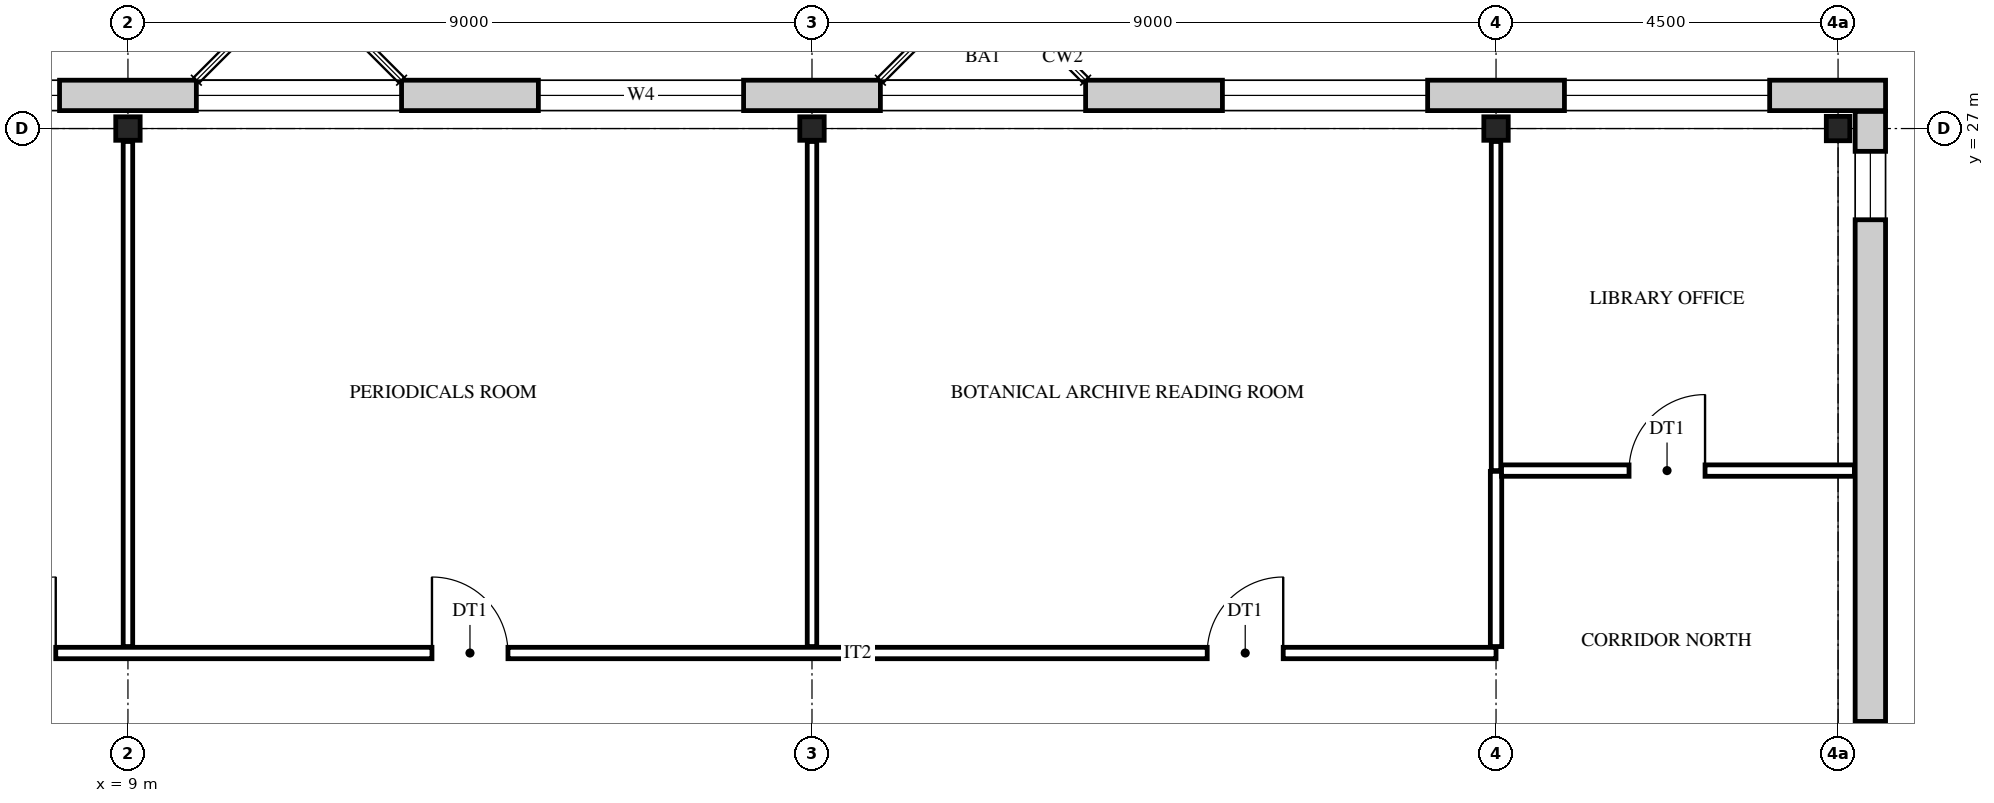
"""IFC4 building model, lengths in metres.
Left out: names, types, materials, properties, quantities, classifications, styles, units other than length and angle.
Written with IfcOpenShell. Run it as: python <this file> out.ifc"""

import sys

from ifc_helpers import new_model, si_unit, direction, frame, frame_2d, origin, origin_2d, place, context, subcontext, project, spatial, rectangle, i_section, extrude, element, fill, save


model = new_model("IFC4")
c1 = context("Model", 3, precision=1e-05, world=origin(), true_north=direction((0.0, 1.0)))
c2 = subcontext(c1, "Body", "Model", "MODEL_VIEW")
j1 = project(units=[si_unit("LENGTHUNIT", "METRE"), si_unit("PLANEANGLEUNIT", "RADIAN")], contexts=[c1])
p1 = place(None, origin())
s1 = spatial("IfcSite", under=j1, at=p1, CompositionType="ELEMENT")
p2 = place(p1, origin())
s2 = spatial("IfcBuilding", under=s1, at=p2, CompositionType="ELEMENT")
p3 = place(p2, frame((0.0, 0.0, 48.6)))
s3 = spatial("IfcBuildingStorey", under=s2, at=p3, CompositionType="ELEMENT", Elevation=48.6)
for number, where, z_axis, x_axis in (
    (1, (9.0, 27.0, 0.0), (0.0, 0.0, 1.0), (0.0, 1.0, 0.0)),
    (2, (18.0, 27.0, 0.0), (0.0, 0.0, 1.0), (0.0, 1.0, 0.0)),
    (3, (27.0, 27.0, 0.0), (0.0, 0.0, 1.0), (0.0, 1.0, 0.0)),
    (4, (31.5, 27.0, 0.0), (0.0, 0.0, 1.0), (1.0, 0.0, 0.0)),
):
    element("IfcColumn", number, at=place(p3, frame(where, z_axis=z_axis, x_axis=x_axis)), inside=s3, PredefinedType="COLUMN", context=c2, shape_type="SweptSolid", body=[
        extrude(i_section(OverallWidth=0.309, OverallDepth=0.321, WebThickness=0.014, FlangeThickness=0.022, FilletRadius=0.017, at=origin_2d()), origin(), (0.0, 0.0, 1.0), 4.2),
    ])
p4 = place(p3, frame((-0.625, 27.436, 0.0), z_axis=(0.0, 0.0, 1.0), x_axis=(1.0, 0.0, 0.0)))
e5 = element("IfcWall", 5, at=p4, inside=s3, PredefinedType="STANDARD", context=c2, shape_type="SweptSolid", body=[
    extrude(rectangle(XDim=32.75, YDim=0.4, at=frame_2d((16.375, 0.0))), origin(), (0.0, 0.0, 1.0), 4.2),
])
p5 = place(p4, frame((1.525, 0.0, 0.9)))
e6 = element("IfcOpeningElement", 6, at=p5, cuts=e5, PredefinedType="OPENING", context=c2, shape_type="SweptSolid", body=[
    extrude(rectangle(XDim=2.7, YDim=2.5, at=frame_2d((1.35, 1.25))), frame((0.0, 0.21, 0.0), z_axis=(0.0, -1.0, 0.0), x_axis=(1.0, 0.0, 0.0)), (0.0, 0.0, 1.0), 0.42),
])
p6 = place(p4, frame((6.025, 0.0, 0.9)))
e7 = element("IfcOpeningElement", 7, at=p6, cuts=e5, PredefinedType="OPENING", context=c2, shape_type="SweptSolid", body=[
    extrude(rectangle(XDim=2.7, YDim=2.5, at=frame_2d((1.35, 1.25))), frame((0.0, 0.21, 0.0), z_axis=(0.0, -1.0, 0.0), x_axis=(1.0, 0.0, 0.0)), (0.0, 0.0, 1.0), 0.42),
])
p7 = place(p4, frame((10.525, 0.0, 0.9)))
e8 = element("IfcOpeningElement", 8, at=p7, cuts=e5, PredefinedType="OPENING", context=c2, shape_type="SweptSolid", body=[
    extrude(rectangle(XDim=2.7, YDim=2.5, at=frame_2d((1.35, 1.25))), frame((0.0, 0.21, 0.0), z_axis=(0.0, -1.0, 0.0), x_axis=(1.0, 0.0, 0.0)), (0.0, 0.0, 1.0), 0.42),
])
p8 = place(p4, frame((15.025, 0.0, 0.9)))
e9 = element("IfcOpeningElement", 9, at=p8, cuts=e5, PredefinedType="OPENING", context=c2, shape_type="SweptSolid", body=[
    extrude(rectangle(XDim=2.7, YDim=2.5, at=frame_2d((1.35, 1.25))), frame((0.0, 0.21, 0.0), z_axis=(0.0, -1.0, 0.0), x_axis=(1.0, 0.0, 0.0)), (0.0, 0.0, 1.0), 0.42),
])
p9 = place(p4, frame((19.525, 0.0, 0.9)))
e10 = element("IfcOpeningElement", 10, at=p9, cuts=e5, PredefinedType="OPENING", context=c2, shape_type="SweptSolid", body=[
    extrude(rectangle(XDim=2.7, YDim=2.5, at=frame_2d((1.35, 1.25))), frame((0.0, 0.21, 0.0), z_axis=(0.0, -1.0, 0.0), x_axis=(1.0, 0.0, 0.0)), (0.0, 0.0, 1.0), 0.42),
])
p10 = place(p4, frame((24.025, 0.0, 0.9)))
e11 = element("IfcOpeningElement", 11, at=p10, cuts=e5, PredefinedType="OPENING", context=c2, shape_type="SweptSolid", body=[
    extrude(rectangle(XDim=2.7, YDim=2.5, at=frame_2d((1.35, 1.25))), frame((0.0, 0.21, 0.0), z_axis=(0.0, -1.0, 0.0), x_axis=(1.0, 0.0, 0.0)), (0.0, 0.0, 1.0), 0.42),
])
p11 = place(p4, frame((28.525, 0.0, 0.9)))
e12 = element("IfcOpeningElement", 12, at=p11, cuts=e5, PredefinedType="OPENING", context=c2, shape_type="SweptSolid", body=[
    extrude(rectangle(XDim=2.7, YDim=2.5, at=frame_2d((1.35, 1.25))), frame((0.0, 0.21, 0.0), z_axis=(0.0, -1.0, 0.0), x_axis=(1.0, 0.0, 0.0)), (0.0, 0.0, 1.0), 0.42),
])
p12 = place(p3, frame((31.925, 27.225, 0.0), z_axis=(0.0, 0.0, 1.0), x_axis=(0.0, -1.0, 0.0)))
e13 = element("IfcWall", 13, at=p12, inside=s3, PredefinedType="STANDARD", context=c2, shape_type="SweptSolid", body=[
    extrude(rectangle(XDim=27.45, YDim=0.4, at=frame_2d((13.725, 0.0))), origin(), (0.0, 0.0, 1.0), 4.2),
])
p13 = place(p12, frame((26.025, 0.0, 0.9)))
e14 = element("IfcOpeningElement", 14, at=p13, cuts=e13, PredefinedType="OPENING", context=c2, shape_type="SweptSolid", body=[
    extrude(rectangle(XDim=0.9, YDim=2.0, at=frame_2d((0.45, 1.0))), frame((0.0, 0.21, 0.0), z_axis=(0.0, -1.0, 0.0), x_axis=(1.0, 0.0, 0.0)), (0.0, 0.0, 1.0), 0.42),
])
p14 = place(p12, frame((18.525, 0.0, 0.9)))
e15 = element("IfcOpeningElement", 15, at=p14, cuts=e13, PredefinedType="OPENING", context=c2, shape_type="SweptSolid", body=[
    extrude(rectangle(XDim=0.9, YDim=2.0, at=frame_2d((0.45, 1.0))), frame((0.0, 0.21, 0.0), z_axis=(0.0, -1.0, 0.0), x_axis=(1.0, 0.0, 0.0)), (0.0, 0.0, 1.0), 0.42),
])
p15 = place(p12, frame((15.675, 0.0, 1.6)))
e16 = element("IfcOpeningElement", 16, at=p15, cuts=e13, PredefinedType="OPENING", context=c2, shape_type="SweptSolid", body=[
    extrude(rectangle(XDim=0.6, YDim=0.9, at=frame_2d((0.3, 0.45))), frame((0.0, 0.21, 0.0), z_axis=(0.0, -1.0, 0.0), x_axis=(1.0, 0.0, 0.0)), (0.0, 0.0, 1.0), 0.42),
])
p16 = place(p12, frame((11.175, 0.0, 1.6)))
e17 = element("IfcOpeningElement", 17, at=p16, cuts=e13, PredefinedType="OPENING", context=c2, shape_type="SweptSolid", body=[
    extrude(rectangle(XDim=0.6, YDim=0.9, at=frame_2d((0.3, 0.45))), frame((0.0, 0.21, 0.0), z_axis=(0.0, -1.0, 0.0), x_axis=(1.0, 0.0, 0.0)), (0.0, 0.0, 1.0), 0.42),
])
p17 = place(p12, frame((8.025, 0.0, 0.9)))
e18 = element("IfcOpeningElement", 18, at=p17, cuts=e13, PredefinedType="OPENING", context=c2, shape_type="SweptSolid", body=[
    extrude(rectangle(XDim=0.9, YDim=2.0, at=frame_2d((0.45, 1.0))), frame((0.0, 0.21, 0.0), z_axis=(0.0, -1.0, 0.0), x_axis=(1.0, 0.0, 0.0)), (0.0, 0.0, 1.0), 0.42),
])
p18 = place(p12, frame((0.525, 0.0, 0.9)))
e19 = element("IfcOpeningElement", 19, at=p18, cuts=e13, PredefinedType="OPENING", context=c2, shape_type="SweptSolid", body=[
    extrude(rectangle(XDim=0.9, YDim=2.0, at=frame_2d((0.45, 1.0))), frame((0.0, 0.21, 0.0), z_axis=(0.0, -1.0, 0.0), x_axis=(1.0, 0.0, 0.0)), (0.0, 0.0, 1.0), 0.42),
])
for number, where, z_axis, x_axis in (
    (20, (9.0, 20.185, 0.0), (0.0, 0.0, 1.0), (0.0, 1.0, 0.0)),
    (21, (18.0, 20.185, 0.0), (0.0, 0.0, 1.0), (0.0, 1.0, 0.0)),
):
    element("IfcWall", number, at=place(p3, frame(where, z_axis=z_axis, x_axis=x_axis)), inside=s3, PredefinedType="PARTITIONING", context=c2, shape_type="SweptSolid", body=[
        extrude(rectangle(XDim=6.645, YDim=0.125, at=frame_2d((3.322, 0.0))), origin(), (0.0, 0.0, 1.0), 3.542),
    ])
p19 = place(p3, frame((27.0, 20.185, 0.0), z_axis=(0.0, 0.0, 1.0), x_axis=(0.0, 1.0, 0.0)))
e22 = element("IfcWall", 22, at=p19, inside=s3, PredefinedType="PARTITIONING", context=c2, shape_type="SweptSolid", body=[
    extrude(rectangle(XDim=2.305, YDim=0.15, at=frame_2d((1.152, 0.0))), origin(), (0.0, 0.0, 1.0), 3.542),
])
p20 = place(p3, frame((27.0, 22.5, 0.0), z_axis=(0.0, 0.0, 1.0), x_axis=(0.0, 1.0, 0.0)))
e23 = element("IfcWall", 23, at=p20, inside=s3, PredefinedType="PARTITIONING", context=c2, shape_type="SweptSolid", body=[
    extrude(rectangle(XDim=4.33, YDim=0.125, at=frame_2d((2.165, 0.0))), origin(), (0.0, 0.0, 1.0), 3.542),
])
p21 = place(p3, frame((6.9, 20.1, 0.0), z_axis=(0.0, 0.0, 1.0), x_axis=(1.0, 0.0, 0.0)))
e24 = element("IfcWall", 24, at=p21, inside=s3, PredefinedType="PARTITIONING", context=c2, shape_type="SweptSolid", body=[
    extrude(rectangle(XDim=20.1, YDim=0.15, at=frame_2d((10.05, 0.0))), origin(), (0.0, 0.0, 1.0), 3.542),
])
p22 = place(p21, frame((0.15, 0.0, 0.0)))
e25 = element("IfcOpeningElement", 25, at=p22, cuts=e24, PredefinedType="OPENING", context=c2, shape_type="SweptSolid", body=[
    extrude(rectangle(XDim=1.0, YDim=2.1, at=frame_2d((0.5, 1.05))), frame((0.0, 0.085, 0.0), z_axis=(0.0, -1.0, 0.0), x_axis=(1.0, 0.0, 0.0)), (0.0, 0.0, 1.0), 0.17),
])
p23 = place(p21, frame((6.1, 0.0, 0.0)))
e26 = element("IfcOpeningElement", 26, at=p23, cuts=e24, PredefinedType="OPENING", context=c2, shape_type="SweptSolid", body=[
    extrude(rectangle(XDim=1.0, YDim=2.1, at=frame_2d((0.5, 1.05))), frame((0.0, 0.085, 0.0), z_axis=(0.0, -1.0, 0.0), x_axis=(1.0, 0.0, 0.0)), (0.0, 0.0, 1.0), 0.17),
])
p24 = place(p21, frame((16.3, 0.0, 0.0)))
e27 = element("IfcOpeningElement", 27, at=p24, cuts=e24, PredefinedType="OPENING", context=c2, shape_type="SweptSolid", body=[
    extrude(rectangle(XDim=1.0, YDim=2.1, at=frame_2d((0.5, 1.05))), frame((0.0, 0.085, 0.0), z_axis=(0.0, -1.0, 0.0), x_axis=(1.0, 0.0, 0.0)), (0.0, 0.0, 1.0), 0.17),
])
p25 = place(p3, frame((27.073, 22.5, 0.0), z_axis=(0.0, 0.0, 1.0), x_axis=(1.0, 0.0, 0.0)))
e28 = element("IfcWall", 28, at=p25, inside=s3, PredefinedType="PARTITIONING", context=c2, shape_type="SweptSolid", body=[
    extrude(rectangle(XDim=4.643, YDim=0.15, at=frame_2d((2.321, 0.0))), origin(), (0.0, 0.0, 1.0), 3.542),
])
p26 = place(p25, frame((1.677, 0.0, 0.0)))
e29 = element("IfcOpeningElement", 29, at=p26, cuts=e28, PredefinedType="OPENING", context=c2, shape_type="SweptSolid", body=[
    extrude(rectangle(XDim=1.0, YDim=2.1, at=frame_2d((0.5, 1.05))), frame((0.0, 0.085, 0.0), z_axis=(0.0, -1.0, 0.0), x_axis=(1.0, 0.0, 0.0)), (0.0, 0.0, 1.0), 0.17),
])
p27 = place(p6, origin())
e30 = element("IfcWindow", 30, at=p27, inside=s3, PartitioningType="SINGLE_PANEL", PredefinedType="WINDOW", context=c2, shape_type="SweptSolid", body=[
    extrude(rectangle(XDim=2.7, YDim=2.5, at=frame_2d((1.35, 1.25))), frame((0.0, 0.03, 0.0), z_axis=(0.0, -1.0, 0.0), x_axis=(1.0, 0.0, 0.0)), (0.0, 0.0, 1.0), 0.06),
])
fill(e7, e30)
p28 = place(p7, origin())
e31 = element("IfcWindow", 31, at=p28, inside=s3, PartitioningType="SINGLE_PANEL", PredefinedType="WINDOW", context=c2, shape_type="SweptSolid", body=[
    extrude(rectangle(XDim=2.7, YDim=2.5, at=frame_2d((1.35, 1.25))), frame((0.0, 0.03, 0.0), z_axis=(0.0, -1.0, 0.0), x_axis=(1.0, 0.0, 0.0)), (0.0, 0.0, 1.0), 0.06),
])
fill(e8, e31)
p29 = place(p8, origin())
e32 = element("IfcWindow", 32, at=p29, inside=s3, PartitioningType="SINGLE_PANEL", PredefinedType="WINDOW", context=c2, shape_type="SweptSolid", body=[
    extrude(rectangle(XDim=2.7, YDim=2.5, at=frame_2d((1.35, 1.25))), frame((0.0, 0.03, 0.0), z_axis=(0.0, -1.0, 0.0), x_axis=(1.0, 0.0, 0.0)), (0.0, 0.0, 1.0), 0.06),
])
fill(e9, e32)
p30 = place(p9, origin())
e33 = element("IfcWindow", 33, at=p30, inside=s3, PartitioningType="SINGLE_PANEL", PredefinedType="WINDOW", context=c2, shape_type="SweptSolid", body=[
    extrude(rectangle(XDim=2.7, YDim=2.5, at=frame_2d((1.35, 1.25))), frame((0.0, 0.03, 0.0), z_axis=(0.0, -1.0, 0.0), x_axis=(1.0, 0.0, 0.0)), (0.0, 0.0, 1.0), 0.06),
])
fill(e10, e33)
p31 = place(p10, origin())
e34 = element("IfcWindow", 34, at=p31, inside=s3, PartitioningType="SINGLE_PANEL", PredefinedType="WINDOW", context=c2, shape_type="SweptSolid", body=[
    extrude(rectangle(XDim=2.7, YDim=2.5, at=frame_2d((1.35, 1.25))), frame((0.0, 0.03, 0.0), z_axis=(0.0, -1.0, 0.0), x_axis=(1.0, 0.0, 0.0)), (0.0, 0.0, 1.0), 0.06),
])
fill(e11, e34)
p32 = place(p11, origin())
e35 = element("IfcWindow", 35, at=p32, inside=s3, PartitioningType="SINGLE_PANEL", PredefinedType="WINDOW", context=c2, shape_type="SweptSolid", body=[
    extrude(rectangle(XDim=2.7, YDim=2.5, at=frame_2d((1.35, 1.25))), frame((0.0, 0.03, 0.0), z_axis=(0.0, -1.0, 0.0), x_axis=(1.0, 0.0, 0.0)), (0.0, 0.0, 1.0), 0.06),
])
fill(e12, e35)
p33 = place(p17, origin())
e36 = element("IfcWindow", 36, at=p33, inside=s3, PartitioningType="SINGLE_PANEL", PredefinedType="WINDOW", context=c2, shape_type="SweptSolid", body=[
    extrude(rectangle(XDim=0.9, YDim=2.0, at=frame_2d((0.45, 1.0))), frame((0.0, 0.03, 0.0), z_axis=(0.0, -1.0, 0.0), x_axis=(1.0, 0.0, 0.0)), (0.0, 0.0, 1.0), 0.06),
])
fill(e18, e36)
p34 = place(p18, origin())
e37 = element("IfcWindow", 37, at=p34, inside=s3, PartitioningType="SINGLE_PANEL", PredefinedType="WINDOW", context=c2, shape_type="SweptSolid", body=[
    extrude(rectangle(XDim=0.9, YDim=2.0, at=frame_2d((0.45, 1.0))), frame((0.0, 0.03, 0.0), z_axis=(0.0, -1.0, 0.0), x_axis=(1.0, 0.0, 0.0)), (0.0, 0.0, 1.0), 0.06),
])
fill(e19, e37)
p35 = place(p22, origin())
e38 = element("IfcDoor", 38, at=p35, inside=s3, OperationType="SINGLE_SWING_RIGHT", PredefinedType="DOOR", context=c2, shape_type="SweptSolid", body=[
    extrude(rectangle(XDim=1.0, YDim=2.1, at=frame_2d((0.5, 1.05))), frame((0.0, 0.025, 0.0), z_axis=(0.0, -1.0, 0.0), x_axis=(1.0, 0.0, 0.0)), (0.0, 0.0, 1.0), 0.05),
])
fill(e25, e38)
p36 = place(p23, origin())
e39 = element("IfcDoor", 39, at=p36, inside=s3, OperationType="SINGLE_SWING_LEFT", PredefinedType="DOOR", context=c2, shape_type="SweptSolid", body=[
    extrude(rectangle(XDim=1.0, YDim=2.1, at=frame_2d((0.5, 1.05))), frame((0.0, 0.025, 0.0), z_axis=(0.0, -1.0, 0.0), x_axis=(1.0, 0.0, 0.0)), (0.0, 0.0, 1.0), 0.05),
])
fill(e26, e39)
p37 = place(p24, origin())
e40 = element("IfcDoor", 40, at=p37, inside=s3, OperationType="SINGLE_SWING_RIGHT", PredefinedType="DOOR", context=c2, shape_type="SweptSolid", body=[
    extrude(rectangle(XDim=1.0, YDim=2.1, at=frame_2d((0.5, 1.05))), frame((0.0, 0.025, 0.0), z_axis=(0.0, -1.0, 0.0), x_axis=(1.0, 0.0, 0.0)), (0.0, 0.0, 1.0), 0.05),
])
fill(e27, e40)
p38 = place(p26, origin())
e41 = element("IfcDoor", 41, at=p38, inside=s3, OperationType="SINGLE_SWING_RIGHT", PredefinedType="DOOR", context=c2, shape_type="SweptSolid", body=[
    extrude(rectangle(XDim=1.0, YDim=2.1, at=frame_2d((0.5, 1.05))), frame((0.0, 0.025, 0.0), z_axis=(0.0, -1.0, 0.0), x_axis=(1.0, 0.0, 0.0)), (0.0, 0.0, 1.0), 0.05),
])
fill(e29, e41)
save(model, sys.argv[1])
